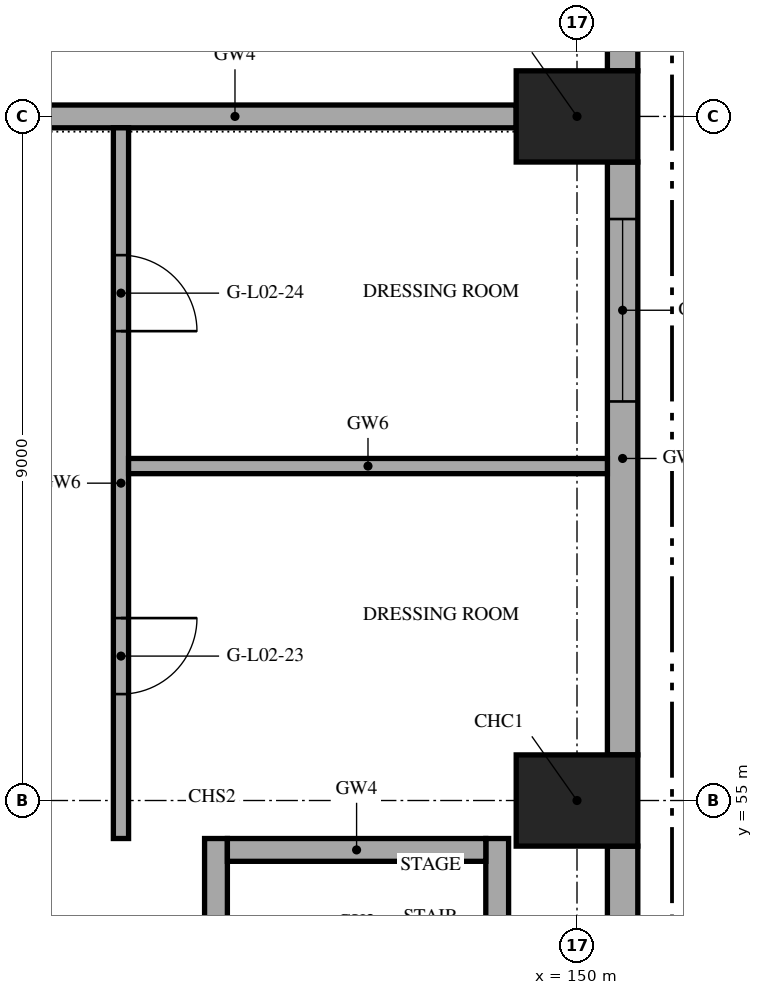
"""IFC4 building model, lengths in metres.
Left out: names, types, materials, properties, quantities, classifications, styles, units other than length and angle.
Written with IfcOpenShell. Run it as: python <this file> out.ifc"""

import sys

from ifc_helpers import new_model, si_unit, direction, frame, frame_2d, origin, origin_2d, place, context, subcontext, project, spatial, rectangle, extrude, element, fill, save


model = new_model("IFC4")
c1 = context("Model", 3, precision=1e-05, world=origin(), true_north=direction((0.0, 1.0)))
c2 = subcontext(c1, "Body", "Model", "MODEL_VIEW")
j1 = project(units=[si_unit("LENGTHUNIT", "METRE"), si_unit("PLANEANGLEUNIT", "RADIAN")], contexts=[c1])
p1 = place(None, origin())
s1 = spatial("IfcSite", under=j1, at=p1, CompositionType="ELEMENT")
p2 = place(p1, origin())
s2 = spatial("IfcBuilding", under=s1, at=p2, CompositionType="ELEMENT")
p3 = place(p2, frame((0.0, 0.0, 10.0)))
s3 = spatial("IfcBuildingStorey", under=s2, at=p3, CompositionType="ELEMENT", Elevation=10.0)
for number, where, z_axis, x_axis in (
    (1, (150.0, 55.0, 0.0), (0.0, 0.0, 1.0), (1.0, 0.0, 0.0)),
    (2, (150.0, 64.0, 0.0), (0.0, 0.0, 1.0), (1.0, 0.0, 0.0)),
):
    element("IfcColumn", number, at=place(p3, frame(where, z_axis=z_axis, x_axis=x_axis)), inside=s3, PredefinedType="COLUMN", context=c2, shape_type="SweptSolid", body=[
        extrude(rectangle(XDim=1.6, YDim=1.2, at=origin_2d()), origin(), (0.0, 0.0, 1.0), 5.0),
    ])
p4 = place(p3, frame((141.8, 64.0, 0.0), z_axis=(0.0, 0.0, 1.0), x_axis=(1.0, 0.0, 0.0)))
e3 = element("IfcWall", 3, at=p4, inside=s3, PredefinedType="SHEAR", context=c2, shape_type="SweptSolid", body=[
    extrude(rectangle(XDim=7.4, YDim=0.3, at=frame_2d((3.7, 0.0))), origin(), (0.0, 0.0, 1.0), 5.0),
])
p5 = place(p3, frame((145.25, 46.2, 0.0), z_axis=(0.0, 0.0, 1.0), x_axis=(0.0, 1.0, 0.0)))
e4 = element("IfcWall", 4, at=p5, inside=s3, PredefinedType="SHEAR", context=c2, shape_type="SweptSolid", body=[
    extrude(rectangle(XDim=8.3, YDim=0.3, at=frame_2d((4.15, 0.0))), origin(), (0.0, 0.0, 1.0), 5.0),
])
p6 = place(p5, frame((0.085, 0.0, 0.0)))
e5 = element("IfcOpeningElement", 5, at=p6, cuts=e4, PredefinedType="OPENING", context=c2, shape_type="SweptSolid", body=[
    extrude(rectangle(XDim=1.45, YDim=2.1, at=frame_2d((0.725, 1.05))), frame((0.0, 0.16, 0.0), z_axis=(0.0, -1.0, 0.0), x_axis=(1.0, 0.0, 0.0)), (0.0, 0.0, 1.0), 0.32),
])
p7 = place(p3, frame((148.95, 46.2, 0.0), z_axis=(0.0, 0.0, 1.0), x_axis=(0.0, 1.0, 0.0)))
e6 = element("IfcWall", 6, at=p7, inside=s3, PredefinedType="SHEAR", context=c2, shape_type="SweptSolid", body=[
    extrude(rectangle(XDim=8.3, YDim=0.3, at=frame_2d((4.15, 0.0))), origin(), (0.0, 0.0, 1.0), 5.0),
])
p8 = place(p3, frame((145.4, 54.35, 0.0), z_axis=(0.0, 0.0, 1.0), x_axis=(1.0, 0.0, 0.0)))
e7 = element("IfcWall", 7, at=p8, inside=s3, PredefinedType="SHEAR", context=c2, shape_type="SweptSolid", body=[
    extrude(rectangle(XDim=3.4, YDim=0.3, at=frame_2d((1.7, 0.0))), origin(), (0.0, 0.0, 1.0), 5.0),
])
p9 = place(p3, frame((150.6, 46.6, 0.0), z_axis=(0.0, 0.0, 1.0), x_axis=(0.0, 1.0, 0.0)))
e8 = element("IfcWall", 8, at=p9, inside=s3, PredefinedType="SOLIDWALL", context=c2, shape_type="SweptSolid", body=[
    extrude(rectangle(XDim=7.8, YDim=0.4, at=frame_2d((3.9, 0.0))), origin(), (0.0, 0.0, 1.0), 5.0),
])
p10 = place(p9, frame((2.7, 0.0, 1.2)))
e9 = element("IfcOpeningElement", 9, at=p10, cuts=e8, PredefinedType="OPENING", context=c2, shape_type="SweptSolid", body=[
    extrude(rectangle(XDim=2.4, YDim=1.8, at=frame_2d((1.2, 0.9))), frame((0.0, 0.21, 0.0), z_axis=(0.0, -1.0, 0.0), x_axis=(1.0, 0.0, 0.0)), (0.0, 0.0, 1.0), 0.42),
])
p11 = place(p3, frame((150.6, 55.6, 0.0), z_axis=(0.0, 0.0, 1.0), x_axis=(0.0, 1.0, 0.0)))
e10 = element("IfcWall", 10, at=p11, inside=s3, PredefinedType="SOLIDWALL", context=c2, shape_type="SweptSolid", body=[
    extrude(rectangle(XDim=7.8, YDim=0.4, at=frame_2d((3.9, 0.0))), origin(), (0.0, 0.0, 1.0), 5.0),
])
p12 = place(p11, frame((4.65, 0.0, 1.2)))
e11 = element("IfcOpeningElement", 11, at=p12, cuts=e10, PredefinedType="OPENING", context=c2, shape_type="SweptSolid", body=[
    extrude(rectangle(XDim=2.4, YDim=1.8, at=frame_2d((1.2, 0.9))), frame((0.0, 0.21, 0.0), z_axis=(0.0, -1.0, 0.0), x_axis=(1.0, 0.0, 0.0)), (0.0, 0.0, 1.0), 0.42),
])
p13 = place(p3, frame((150.6, 64.6, 0.0), z_axis=(0.0, 0.0, 1.0), x_axis=(0.0, 1.0, 0.0)))
e12 = element("IfcWall", 12, at=p13, inside=s3, PredefinedType="SOLIDWALL", context=c2, shape_type="SweptSolid", body=[
    extrude(rectangle(XDim=7.8, YDim=0.4, at=frame_2d((3.9, 0.0))), origin(), (0.0, 0.0, 1.0), 5.0),
])
p14 = place(p3, frame((144.0, 54.5, 0.0), z_axis=(0.0, 0.0, 1.0), x_axis=(0.0, 1.0, 0.0)))
e13 = element("IfcWall", 13, at=p14, inside=s3, PredefinedType="PARTITIONING", context=c2, shape_type="SweptSolid", body=[
    extrude(rectangle(XDim=9.35, YDim=0.2, at=frame_2d((4.675, 0.0))), origin(), (0.0, 0.0, 1.0), 4.7),
])
p15 = place(p14, frame((1.9, 0.0, 0.0)))
e14 = element("IfcOpeningElement", 14, at=p15, cuts=e13, PredefinedType="OPENING", context=c2, shape_type="SweptSolid", body=[
    extrude(rectangle(XDim=1.0, YDim=2.1, at=frame_2d((0.5, 1.05))), frame((0.0, 0.11, 0.0), z_axis=(0.0, -1.0, 0.0), x_axis=(1.0, 0.0, 0.0)), (0.0, 0.0, 1.0), 0.22),
])
p16 = place(p14, frame((6.675, 0.0, 0.0)))
e15 = element("IfcOpeningElement", 15, at=p16, cuts=e13, PredefinedType="OPENING", context=c2, shape_type="SweptSolid", body=[
    extrude(rectangle(XDim=1.0, YDim=2.1, at=frame_2d((0.5, 1.05))), frame((0.0, 0.11, 0.0), z_axis=(0.0, -1.0, 0.0), x_axis=(1.0, 0.0, 0.0)), (0.0, 0.0, 1.0), 0.22),
])
p17 = place(p3, frame((144.1, 59.4, 0.0), z_axis=(0.0, 0.0, 1.0), x_axis=(1.0, 0.0, 0.0)))
e16 = element("IfcWall", 16, at=p17, inside=s3, PredefinedType="PARTITIONING", context=c2, shape_type="SweptSolid", body=[
    extrude(rectangle(XDim=6.3, YDim=0.2, at=frame_2d((3.15, 0.0))), origin(), (0.0, 0.0, 1.0), 4.7),
])
p18 = place(p12, origin())
e17 = element("IfcWindow", 17, at=p18, inside=s3, PartitioningType="SINGLE_PANEL", PredefinedType="WINDOW", context=c2, shape_type="SweptSolid", body=[
    extrude(rectangle(XDim=2.4, YDim=1.8, at=frame_2d((1.2, 0.9))), frame((0.0, 0.03, 0.0), z_axis=(0.0, -1.0, 0.0), x_axis=(1.0, 0.0, 0.0)), (0.0, 0.0, 1.0), 0.06),
])
fill(e11, e17)
p19 = place(p15, frame((1.0, 0.0, 0.0), z_axis=(0.0, 0.0, 1.0), x_axis=(-1.0, 0.0, 0.0)))
e18 = element("IfcDoor", 18, at=p19, inside=s3, OperationType="SINGLE_SWING_LEFT", PredefinedType="DOOR", context=c2, shape_type="SweptSolid", body=[
    extrude(rectangle(XDim=1.0, YDim=2.1, at=frame_2d((0.5, 1.05))), frame((0.0, 0.025, 0.0), z_axis=(0.0, -1.0, 0.0), x_axis=(1.0, 0.0, 0.0)), (0.0, 0.0, 1.0), 0.05),
])
fill(e14, e18)
p20 = place(p16, frame((1.0, 0.0, 0.0), z_axis=(0.0, 0.0, 1.0), x_axis=(-1.0, 0.0, 0.0)))
e19 = element("IfcDoor", 19, at=p20, inside=s3, OperationType="SINGLE_SWING_RIGHT", PredefinedType="DOOR", context=c2, shape_type="SweptSolid", body=[
    extrude(rectangle(XDim=1.0, YDim=2.1, at=frame_2d((0.5, 1.05))), frame((0.0, 0.025, 0.0), z_axis=(0.0, -1.0, 0.0), x_axis=(1.0, 0.0, 0.0)), (0.0, 0.0, 1.0), 0.05),
])
fill(e15, e19)
save(model, sys.argv[1])
